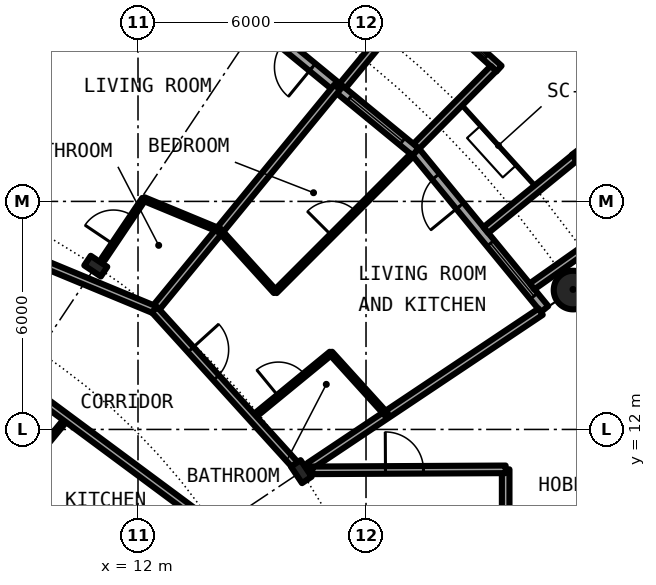
"""IFC4 building model, lengths in metres.
Left out: names, types, materials, properties, quantities, classifications, styles, units other than length and angle.
Written with IfcOpenShell. Run it as: python <this file> out.ifc"""

import sys

from ifc_helpers import new_model, si_unit, direction, frame, frame_2d, origin, origin_2d, place, context, subcontext, project, spatial, rectangle, circle, hollow_circle, i_section, extrude, element, fill, save


model = new_model("IFC4")
c1 = context("Model", 3, precision=1e-05, world=origin(), true_north=direction((0.0, 1.0)))
c2 = subcontext(c1, "Body", "Model", "MODEL_VIEW")
j1 = project(units=[si_unit("LENGTHUNIT", "METRE"), si_unit("PLANEANGLEUNIT", "RADIAN")], contexts=[c1])
p1 = place(None, origin())
s1 = spatial("IfcSite", under=j1, at=p1, CompositionType="ELEMENT")
p2 = place(p1, origin())
s2 = spatial("IfcBuilding", under=s1, at=p2, CompositionType="ELEMENT")
p3 = place(p2, frame((0.0, 0.0, 72.75)))
s3 = spatial("IfcBuildingStorey", under=s2, at=p3, CompositionType="ELEMENT", Elevation=72.75)
p4 = place(p3, frame((23.448, 15.667, 0.0), z_axis=(0.0, 0.0, 1.0), x_axis=(1.0, 0.0, 0.0)))
e1 = element("IfcColumn", 1, at=p4, inside=s3, PredefinedType="COLUMN", context=c2, shape_type="SweptSolid", body=[
    extrude(hollow_circle(Radius=0.508, WallThickness=0.04, at=origin_2d()), origin(), (0.0, 0.0, 1.0), 3.05),
])
for number, where, z_axis, x_axis in (
    (2, (16.297, 10.889, 0.0), (0.0, 0.0, 1.0), (0.831, 0.556, 0.0)),
    (3, (10.889, 16.297, 0.0), (0.0, 0.0, 1.0), (0.556, 0.831, 0.0)),
):
    element("IfcColumn", number, at=place(p3, frame(where, z_axis=z_axis, x_axis=x_axis)), inside=s3, PredefinedType="COLUMN", context=c2, shape_type="SweptSolid", body=[
        extrude(i_section(OverallWidth=0.306, OverallDepth=0.524, WebThickness=0.021, FlangeThickness=0.04, FilletRadius=0.027, at=origin_2d()), origin(), (0.0, 0.0, 1.0), 3.05),
    ])
p5 = place(p3, frame((22.699, 15.167, 0.0), z_axis=(0.0, 0.0, 1.0), x_axis=(-0.634382322723, 0.773019449054, 0.0)))
e4 = element("IfcWall", 4, at=p5, inside=s3, PredefinedType="SOLIDWALL", context=c2, shape_type="SweptSolid", body=[
    extrude(rectangle(XDim=5.352, YDim=0.25, at=frame_2d((2.676, 0.0))), origin(), (0.0, 0.0, 1.0), 2.7),
])
p6 = place(p5, frame((0.441, 0.0, 0.3)))
e5 = element("IfcOpeningElement", 5, at=p6, cuts=e4, PredefinedType="OPENING", context=c2, shape_type="SweptSolid", body=[
    extrude(rectangle(XDim=1.8, YDim=2.1, at=frame_2d((0.9, 1.05))), frame((0.0, 0.135, 0.0), z_axis=(0.0, -1.0, 0.0), x_axis=(1.0, 0.0, 0.0)), (0.0, 0.0, 1.0), 0.27),
])
p7 = place(p5, frame((3.51, 0.0, 0.0)))
e6 = element("IfcOpeningElement", 6, at=p7, cuts=e4, PredefinedType="OPENING", context=c2, shape_type="SweptSolid", body=[
    extrude(rectangle(XDim=1.0, YDim=2.2, at=frame_2d((0.5, 1.1))), frame((0.0, 0.135, 0.0), z_axis=(0.0, -1.0, 0.0), x_axis=(1.0, 0.0, 0.0)), (0.0, 0.0, 1.0), 0.27),
])
p8 = place(p3, frame((24.909, 17.427, -0.03), z_axis=(0.0, 0.0, 1.0), x_axis=(-0.60418752353, 0.796842165306, 0.0)))
e7 = element("IfcWall", 7, at=p8, inside=s3, PredefinedType="SOLIDWALL", context=c2, shape_type="SweptSolid", body=[
    extrude(rectangle(XDim=2.337, YDim=0.2, at=frame_2d((1.168, 0.0))), origin(), (0.0, 0.0, 1.0), 2.73),
])
p9 = place(p8, frame((0.128, 0.0, 0.33)))
e8 = element("IfcOpeningElement", 8, at=p9, cuts=e7, PredefinedType="OPENING", context=c2, shape_type="SweptSolid", body=[
    extrude(circle(Radius=1.04, at=frame_2d((1.04, 1.04))), frame((0.0, 0.11, 0.0), z_axis=(0.0, -1.0, 0.0), x_axis=(1.0, 0.0, 0.0)), (0.0, 0.0, 1.0), 0.22),
])
p10 = place(p3, frame((22.37, 15.765, -0.03), z_axis=(0.0, 0.0, 1.0), x_axis=(0.817256123454, 0.576274612209, 0.0)))
e9 = element("IfcWall", 9, at=p10, inside=s3, PredefinedType="SOLIDWALL", context=c2, shape_type="SweptSolid", body=[
    extrude(rectangle(XDim=2.933, YDim=0.2, at=frame_2d((1.466, 0.0))), origin(), (0.0, 0.0, 1.0), 2.73),
])
p11 = place(p3, frame((21.155, 17.246, -0.03), z_axis=(0.0, 0.0, 1.0), x_axis=(0.775179004516, 0.631741648902, 0.0)))
e10 = element("IfcWall", 10, at=p11, inside=s3, PredefinedType="SOLIDWALL", context=c2, shape_type="SweptSolid", body=[
    extrude(rectangle(XDim=3.006, YDim=0.2, at=frame_2d((1.503, 0.0))), origin(), (0.0, 0.0, 1.0), 2.73),
])
p12 = place(p3, frame((19.304, 19.304, 0.0), z_axis=(0.0, 0.0, 1.0), x_axis=(-0.773019449054, 0.634382322723, 0.0)))
e11 = element("IfcWall", 11, at=p12, inside=s3, PredefinedType="SOLIDWALL", context=c2, shape_type="SweptSolid", body=[
    extrude(rectangle(XDim=5.352, YDim=0.25, at=frame_2d((2.676, 0.0))), origin(), (0.0, 0.0, 1.0), 2.7),
])
p13 = place(p12, frame((0.441, 0.0, 0.3)))
e12 = element("IfcOpeningElement", 12, at=p13, cuts=e11, PredefinedType="OPENING", context=c2, shape_type="SweptSolid", body=[
    extrude(rectangle(XDim=1.8, YDim=2.1, at=frame_2d((0.9, 1.05))), frame((0.0, 0.135, 0.0), z_axis=(0.0, -1.0, 0.0), x_axis=(1.0, 0.0, 0.0)), (0.0, 0.0, 1.0), 0.27),
])
p14 = place(p12, frame((3.51, 0.0, 0.0)))
e13 = element("IfcOpeningElement", 13, at=p14, cuts=e11, PredefinedType="OPENING", context=c2, shape_type="SweptSolid", body=[
    extrude(rectangle(XDim=1.0, YDim=2.2, at=frame_2d((0.5, 1.1))), frame((0.0, 0.135, 0.0), z_axis=(0.0, -1.0, 0.0), x_axis=(1.0, 0.0, 0.0)), (0.0, 0.0, 1.0), 0.27),
])
p15 = place(p3, frame((21.5, 21.493, -0.03), z_axis=(0.0, 0.0, 1.0), x_axis=(-0.740998365753, 0.671506829416, 0.0)))
e14 = element("IfcWall", 14, at=p15, inside=s3, PredefinedType="SOLIDWALL", context=c2, shape_type="SweptSolid", body=[
    extrude(rectangle(XDim=2.993, YDim=0.2, at=frame_2d((1.497, 0.0))), origin(), (0.0, 0.0, 1.0), 2.73),
])
p16 = place(p15, frame((0.457, 0.0, 0.33)))
e15 = element("IfcOpeningElement", 15, at=p16, cuts=e14, PredefinedType="OPENING", context=c2, shape_type="SweptSolid", body=[
    extrude(circle(Radius=1.04, at=frame_2d((1.04, 1.04))), frame((0.0, 0.11, 0.0), z_axis=(0.0, -1.0, 0.0), x_axis=(1.0, 0.0, 0.0)), (0.0, 0.0, 1.0), 0.22),
])
p17 = place(p3, frame((19.323, 19.45, -0.03), z_axis=(0.0, 0.0, 1.0), x_axis=(0.704476739375, 0.709727076896, 0.0)))
e16 = element("IfcWall", 16, at=p17, inside=s3, PredefinedType="SOLIDWALL", context=c2, shape_type="SweptSolid", body=[
    extrude(rectangle(XDim=2.883, YDim=0.2, at=frame_2d((1.441, 0.0))), origin(), (0.0, 0.0, 1.0), 2.73),
])
p18 = place(p3, frame((17.384, 21.041, -0.03), z_axis=(0.0, 0.0, 1.0), x_axis=(0.63709551667, 0.770784861449, 0.0)))
e17 = element("IfcWall", 17, at=p18, inside=s3, PredefinedType="SOLIDWALL", context=c2, shape_type="SweptSolid", body=[
    extrude(rectangle(XDim=3.006, YDim=0.2, at=frame_2d((1.503, 0.0))), origin(), (0.0, 0.0, 1.0), 2.73),
])
p19 = place(p3, frame((21.675, 9.3, 0.0), z_axis=(0.0, 0.0, 1.0), x_axis=(0.0, 1.0, 0.0)))
e18 = element("IfcWall", 18, at=p19, inside=s3, PredefinedType="PARTITIONING", context=c2, shape_type="SweptSolid", body=[
    extrude(rectangle(XDim=1.65, YDim=0.2, at=frame_2d((0.825, 0.0))), origin(), (0.0, 0.0, 1.0), 2.7),
])
p20 = place(p3, frame((7.178, 17.328, 0.0), z_axis=(0.0, 0.0, 1.0), x_axis=(0.382458509789, 0.923972666419, 0.0)))
e19 = element("IfcWall", 19, at=p20, inside=s3, PredefinedType="PARTITIONING", context=c2, shape_type="SweptSolid", body=[
    extrude(rectangle(XDim=8.419, YDim=0.1, at=frame_2d((4.209, 0.0))), origin(), (0.0, 0.0, 1.0), 2.7),
])
p21 = place(p20, frame((0.841, 0.0, 0.0)))
e20 = element("IfcOpeningElement", 20, at=p21, cuts=e19, PredefinedType="OPENING", context=c2, shape_type="SweptSolid", body=[
    extrude(rectangle(XDim=0.9, YDim=2.3, at=frame_2d((0.45, 1.15))), frame((0.0, 0.06, 0.0), z_axis=(0.0, -1.0, 0.0), x_axis=(1.0, 0.0, 0.0)), (0.0, 0.0, 1.0), 0.12),
])
p22 = place(p20, frame((5.051, 0.0, 0.0)))
e21 = element("IfcOpeningElement", 21, at=p22, cuts=e19, PredefinedType="OPENING", context=c2, shape_type="SweptSolid", body=[
    extrude(rectangle(XDim=0.9, YDim=2.3, at=frame_2d((0.45, 1.15))), frame((0.0, 0.06, 0.0), z_axis=(0.0, -1.0, 0.0), x_axis=(1.0, 0.0, 0.0)), (0.0, 0.0, 1.0), 0.12),
])
p23 = place(p3, frame((16.515, 11.034, 0.0), z_axis=(0.0, 0.0, 1.0), x_axis=(0.831382022135, 0.555701298605, 0.0)))
e22 = element("IfcWall", 22, at=p23, inside=s3, PredefinedType="PARTITIONING", context=c2, shape_type="SweptSolid", body=[
    extrude(rectangle(XDim=7.313, YDim=0.2, at=frame_2d((3.657, 0.0))), origin(), (0.0, 0.0, 1.0), 2.7),
])
p24 = place(p3, frame((4.909, 5.958, 0.0), z_axis=(0.0, 0.0, 1.0), x_axis=(0.635976043025, 0.771708800454, 0.0)))
e23 = element("IfcWall", 23, at=p24, inside=s3, PredefinedType="PARTITIONING", context=c2, shape_type="SweptSolid", body=[
    extrude(rectangle(XDim=8.213, YDim=0.1, at=frame_2d((4.106, 0.0))), origin(), (0.0, 0.0, 1.0), 2.7),
])
p25 = place(p24, frame((6.49, 0.0, 0.0)))
e24 = element("IfcOpeningElement", 24, at=p25, cuts=e23, PredefinedType="OPENING", context=c2, shape_type="SweptSolid", body=[
    extrude(rectangle(XDim=0.9, YDim=2.3, at=frame_2d((0.45, 1.15))), frame((0.0, 0.06, 0.0), z_axis=(0.0, -1.0, 0.0), x_axis=(1.0, 0.0, 0.0)), (0.0, 0.0, 1.0), 0.12),
])
p26 = place(p24, frame((2.384, 0.0, 0.0)))
e25 = element("IfcOpeningElement", 25, at=p26, cuts=e23, PredefinedType="OPENING", context=c2, shape_type="SweptSolid", body=[
    extrude(rectangle(XDim=0.9, YDim=2.3, at=frame_2d((0.45, 1.15))), frame((0.0, 0.06, 0.0), z_axis=(0.0, -1.0, 0.0), x_axis=(1.0, 0.0, 0.0)), (0.0, 0.0, 1.0), 0.12),
])
p27 = place(p3, frame((11.087, 16.48, 0.0), z_axis=(0.0, 0.0, 1.0), x_axis=(0.558383137663, 0.829583191472, 0.0)))
e26 = element("IfcWall", 26, at=p27, inside=s3, PredefinedType="PARTITIONING", context=c2, shape_type="SweptSolid", body=[
    extrude(rectangle(XDim=1.909, YDim=0.1, at=frame_2d((0.955, 0.0))), origin(), (0.0, 0.0, 1.0), 2.7),
])
p28 = place(p27, frame((0.474, 0.0, 0.0)))
e27 = element("IfcOpeningElement", 27, at=p28, cuts=e26, PredefinedType="OPENING", context=c2, shape_type="SweptSolid", body=[
    extrude(rectangle(XDim=0.9, YDim=2.3, at=frame_2d((0.45, 1.15))), frame((0.0, 0.06, 0.0), z_axis=(0.0, -1.0, 0.0), x_axis=(1.0, 0.0, 0.0)), (0.0, 0.0, 1.0), 0.12),
])
p29 = place(p3, frame((12.435, 15.15, 0.0), z_axis=(0.0, 0.0, 1.0), x_axis=(0.634458323308, 0.772957072537, 0.0)))
e28 = element("IfcWall", 28, at=p29, inside=s3, PredefinedType="PARTITIONING", context=c2, shape_type="SweptSolid", body=[
    extrude(rectangle(XDim=7.576, YDim=0.2, at=frame_2d((3.788, 0.0))), origin(), (0.0, 0.0, 1.0), 2.7),
])
p30 = place(p3, frame((15.009, 12.31, 0.0), z_axis=(0.0, 0.0, 1.0), x_axis=(0.77319617123, 0.634166918717, 0.0)))
e29 = element("IfcWall", 29, at=p30, inside=s3, PredefinedType="PARTITIONING", context=c2, shape_type="SweptSolid", body=[
    extrude(rectangle(XDim=2.675, YDim=0.1, at=frame_2d((1.337, 0.0))), origin(), (0.0, 0.0, 1.0), 2.7),
])
p31 = place(p30, frame((0.887, 0.0, 0.0)))
e30 = element("IfcOpeningElement", 30, at=p31, cuts=e29, PredefinedType="OPENING", context=c2, shape_type="SweptSolid", body=[
    extrude(rectangle(XDim=0.9, YDim=2.3, at=frame_2d((0.45, 1.15))), frame((0.0, 0.06, 0.0), z_axis=(0.0, -1.0, 0.0), x_axis=(1.0, 0.0, 0.0)), (0.0, 0.0, 1.0), 0.12),
])
p32 = place(p3, frame((15.612, 15.622, 0.0), z_axis=(0.0, 0.0, 1.0), x_axis=(0.706914880313, 0.707298629994, 0.0)))
e31 = element("IfcWall", 31, at=p32, inside=s3, PredefinedType="PARTITIONING", context=c2, shape_type="SweptSolid", body=[
    extrude(rectangle(XDim=5.09, YDim=0.1, at=frame_2d((2.545, 0.0))), origin(), (0.0, 0.0, 1.0), 2.7),
])
p33 = place(p32, frame((2.095, 0.0, 0.0)))
e32 = element("IfcOpeningElement", 32, at=p33, cuts=e31, PredefinedType="OPENING", context=c2, shape_type="SweptSolid", body=[
    extrude(rectangle(XDim=0.9, YDim=2.3, at=frame_2d((0.45, 1.15))), frame((0.0, 0.06, 0.0), z_axis=(0.0, -1.0, 0.0), x_axis=(1.0, 0.0, 0.0)), (0.0, 0.0, 1.0), 0.12),
])
p34 = place(p3, frame((16.589, 10.924, 0.0), z_axis=(0.0, 0.0, 1.0), x_axis=(0.999987054722, 0.005088259783, 0.0)))
e33 = element("IfcWall", 33, at=p34, inside=s3, PredefinedType="PARTITIONING", context=c2, shape_type="SweptSolid", body=[
    extrude(rectangle(XDim=5.086, YDim=0.2, at=frame_2d((2.543, 0.0))), origin(), (0.0, 0.0, 1.0), 2.7),
])
p35 = place(p34, frame((1.923, 0.0, 0.0)))
e34 = element("IfcOpeningElement", 34, at=p35, cuts=e33, PredefinedType="OPENING", context=c2, shape_type="SweptSolid", body=[
    extrude(rectangle(XDim=1.0, YDim=2.3, at=frame_2d((0.5, 1.15))), frame((0.0, 0.11, 0.0), z_axis=(0.0, -1.0, 0.0), x_axis=(1.0, 0.0, 0.0)), (0.0, 0.0, 1.0), 0.22),
])
p36 = place(p3, frame((8.512, 10.332, 0.0), z_axis=(0.0, 0.0, 1.0), x_axis=(0.803135014325, -0.595797070121, 0.0)))
e35 = element("IfcWall", 35, at=p36, inside=s3, PredefinedType="PARTITIONING", context=c2, shape_type="SweptSolid", body=[
    extrude(rectangle(XDim=1.732, YDim=0.1, at=frame_2d((0.866, 0.0))), origin(), (0.0, 0.0, 1.0), 2.7),
])
p37 = place(p3, frame((4.906, 16.172, 0.0), z_axis=(0.0, 0.0, 1.0), x_axis=(0.803204584823, -0.59570327758, 0.0)))
e36 = element("IfcWall", 36, at=p37, inside=s3, PredefinedType="PARTITIONING", context=c2, shape_type="SweptSolid", body=[
    extrude(rectangle(XDim=11.387, YDim=0.2, at=frame_2d((5.693, 0.0))), origin(), (0.0, 0.0, 1.0), 2.7),
])
p38 = place(p37, frame((4.38, 0.0, 0.0)))
e37 = element("IfcOpeningElement", 37, at=p38, cuts=e36, PredefinedType="OPENING", context=c2, shape_type="SweptSolid", body=[
    extrude(rectangle(XDim=1.0, YDim=2.3, at=frame_2d((0.5, 1.15))), frame((0.0, 0.11, 0.0), z_axis=(0.0, -1.0, 0.0), x_axis=(1.0, 0.0, 0.0)), (0.0, 0.0, 1.0), 0.22),
])
p39 = place(p3, frame((1.921, 19.506, 0.0), z_axis=(0.0, 0.0, 1.0), x_axis=(0.923845560554, -0.38276543763, 0.0)))
e38 = element("IfcWall", 38, at=p39, inside=s3, PredefinedType="PARTITIONING", context=c2, shape_type="SweptSolid", body=[
    extrude(rectangle(XDim=11.381, YDim=0.2, at=frame_2d((5.69, 0.0))), origin(), (0.0, 0.0, 1.0), 2.7),
])
p40 = place(p39, frame((7.087, 0.0, 0.0)))
e39 = element("IfcOpeningElement", 39, at=p40, cuts=e38, PredefinedType="OPENING", context=c2, shape_type="SweptSolid", body=[
    extrude(rectangle(XDim=1.0, YDim=2.3, at=frame_2d((0.5, 1.15))), frame((0.0, 0.11, 0.0), z_axis=(0.0, -1.0, 0.0), x_axis=(1.0, 0.0, 0.0)), (0.0, 0.0, 1.0), 0.22),
])
p41 = place(p3, frame((12.434, 15.151, 0.0), z_axis=(0.0, 0.0, 1.0), x_axis=(0.671601747072, -0.740912338492, 0.0)))
e40 = element("IfcWall", 40, at=p41, inside=s3, PredefinedType="PARTITIONING", context=c2, shape_type="SweptSolid", body=[
    extrude(rectangle(XDim=5.597, YDim=0.2, at=frame_2d((2.799, 0.0))), origin(), (0.0, 0.0, 1.0), 2.38),
])
p42 = place(p41, frame((1.417, 0.0, 0.0)))
e41 = element("IfcOpeningElement", 41, at=p42, cuts=e40, PredefinedType="OPENING", context=c2, shape_type="SweptSolid", body=[
    extrude(rectangle(XDim=1.0, YDim=2.3, at=frame_2d((0.5, 1.15))), frame((0.0, 0.11, 0.0), z_axis=(0.0, -1.0, 0.0), x_axis=(1.0, 0.0, 0.0)), (0.0, 0.0, 1.0), 0.22),
])
p43 = place(p3, frame((12.155, 18.062, 0.0), z_axis=(0.0, 0.0, 1.0), x_axis=(0.923874819588, -0.382694810171, 0.0)))
e42 = element("IfcWall", 42, at=p43, inside=s3, PredefinedType="PARTITIONING", context=c2, shape_type="SweptSolid", body=[
    extrude(rectangle(XDim=2.158, YDim=0.1, at=frame_2d((1.079, 0.0))), origin(), (0.0, 0.0, 1.0), 2.7),
])
p44 = place(p3, frame((14.147, 17.238, 0.0), z_axis=(0.0, 0.0, 1.0), x_axis=(0.671674967707, -0.740845960882, 0.0)))
e43 = element("IfcWall", 43, at=p44, inside=s3, PredefinedType="PARTITIONING", context=c2, shape_type="SweptSolid", body=[
    extrude(rectangle(XDim=2.181, YDim=0.1, at=frame_2d((1.091, 0.0))), origin(), (0.0, 0.0, 1.0), 2.7),
])
p45 = place(p3, frame((17.072, 14.011, 0.0), z_axis=(0.0, 0.0, 1.0), x_axis=(0.67169789574, -0.740825172937, 0.0)))
e44 = element("IfcWall", 44, at=p45, inside=s3, PredefinedType="PARTITIONING", context=c2, shape_type="SweptSolid", body=[
    extrude(rectangle(XDim=2.183, YDim=0.1, at=frame_2d((1.091, 0.0))), origin(), (0.0, 0.0, 1.0), 2.7),
])
p46 = place(p6, origin())
e45 = element("IfcWindow", 45, at=p46, inside=s3, PartitioningType="SINGLE_PANEL", PredefinedType="WINDOW", context=c2, shape_type="SweptSolid", body=[
    extrude(rectangle(XDim=1.8, YDim=2.1, at=frame_2d((0.9, 1.05))), frame((0.0, 0.03, 0.0), z_axis=(0.0, -1.0, 0.0), x_axis=(1.0, 0.0, 0.0)), (0.0, 0.0, 1.0), 0.06),
])
fill(e5, e45)
p47 = place(p7, origin())
e46 = element("IfcDoor", 46, at=p47, inside=s3, OperationType="SINGLE_SWING_LEFT", PredefinedType="DOOR", context=c2, shape_type="SweptSolid", body=[
    extrude(rectangle(XDim=1.0, YDim=2.2, at=frame_2d((0.5, 1.1))), frame((0.0, 0.025, 0.0), z_axis=(0.0, -1.0, 0.0), x_axis=(1.0, 0.0, 0.0)), (0.0, 0.0, 1.0), 0.05),
])
fill(e6, e46)
p48 = place(p13, origin())
e47 = element("IfcWindow", 47, at=p48, inside=s3, PartitioningType="SINGLE_PANEL", PredefinedType="WINDOW", context=c2, shape_type="SweptSolid", body=[
    extrude(rectangle(XDim=1.8, YDim=2.1, at=frame_2d((0.9, 1.05))), frame((0.0, 0.03, 0.0), z_axis=(0.0, -1.0, 0.0), x_axis=(1.0, 0.0, 0.0)), (0.0, 0.0, 1.0), 0.06),
])
fill(e12, e47)
p49 = place(p16, origin())
e48 = element("IfcWindow", 48, at=p49, inside=s3, PartitioningType="SINGLE_PANEL", PredefinedType="WINDOW", context=c2, shape_type="SweptSolid", body=[
    extrude(circle(Radius=1.04, at=frame_2d((1.04, 1.04))), frame((0.0, 0.03, 0.0), z_axis=(0.0, -1.0, 0.0), x_axis=(1.0, 0.0, 0.0)), (0.0, 0.0, 1.0), 0.06),
])
fill(e15, e48)
p50 = place(p14, origin())
e49 = element("IfcDoor", 49, at=p50, inside=s3, OperationType="SINGLE_SWING_LEFT", PredefinedType="DOOR", context=c2, shape_type="SweptSolid", body=[
    extrude(rectangle(XDim=1.0, YDim=2.2, at=frame_2d((0.5, 1.1))), frame((0.0, 0.025, 0.0), z_axis=(0.0, -1.0, 0.0), x_axis=(1.0, 0.0, 0.0)), (0.0, 0.0, 1.0), 0.05),
])
fill(e13, e49)
p51 = place(p42, origin())
e50 = element("IfcDoor", 50, at=p51, inside=s3, OperationType="SINGLE_SWING_LEFT", PredefinedType="DOOR", context=c2, shape_type="SweptSolid", body=[
    extrude(rectangle(XDim=1.0, YDim=2.3, at=frame_2d((0.5, 1.15))), frame((0.0, 0.025, 0.0), z_axis=(0.0, -1.0, 0.0), x_axis=(1.0, 0.0, 0.0)), (0.0, 0.0, 1.0), 0.05),
])
fill(e41, e50)
p52 = place(p31, origin())
e51 = element("IfcDoor", 51, at=p52, inside=s3, OperationType="SINGLE_SWING_RIGHT", PredefinedType="DOOR", context=c2, shape_type="SweptSolid", body=[
    extrude(rectangle(XDim=0.9, YDim=2.3, at=frame_2d((0.45, 1.15))), frame((0.0, 0.025, 0.0), z_axis=(0.0, -1.0, 0.0), x_axis=(1.0, 0.0, 0.0)), (0.0, 0.0, 1.0), 0.05),
])
fill(e30, e51)
p53 = place(p33, origin())
e52 = element("IfcDoor", 52, at=p53, inside=s3, OperationType="SINGLE_SWING_LEFT", PredefinedType="DOOR", context=c2, shape_type="SweptSolid", body=[
    extrude(rectangle(XDim=0.9, YDim=2.3, at=frame_2d((0.45, 1.15))), frame((0.0, 0.025, 0.0), z_axis=(0.0, -1.0, 0.0), x_axis=(1.0, 0.0, 0.0)), (0.0, 0.0, 1.0), 0.05),
])
fill(e32, e52)
p54 = place(p28, origin())
e53 = element("IfcDoor", 53, at=p54, inside=s3, OperationType="SINGLE_SWING_LEFT", PredefinedType="DOOR", context=c2, shape_type="SweptSolid", body=[
    extrude(rectangle(XDim=0.9, YDim=2.3, at=frame_2d((0.45, 1.15))), frame((0.0, 0.025, 0.0), z_axis=(0.0, -1.0, 0.0), x_axis=(1.0, 0.0, 0.0)), (0.0, 0.0, 1.0), 0.05),
])
fill(e27, e53)
p55 = place(p35, origin())
e54 = element("IfcDoor", 54, at=p55, inside=s3, OperationType="SINGLE_SWING_LEFT", PredefinedType="DOOR", context=c2, shape_type="SweptSolid", body=[
    extrude(rectangle(XDim=1.0, YDim=2.3, at=frame_2d((0.5, 1.15))), frame((0.0, 0.025, 0.0), z_axis=(0.0, -1.0, 0.0), x_axis=(1.0, 0.0, 0.0)), (0.0, 0.0, 1.0), 0.05),
])
fill(e34, e54)
save(model, sys.argv[1])
